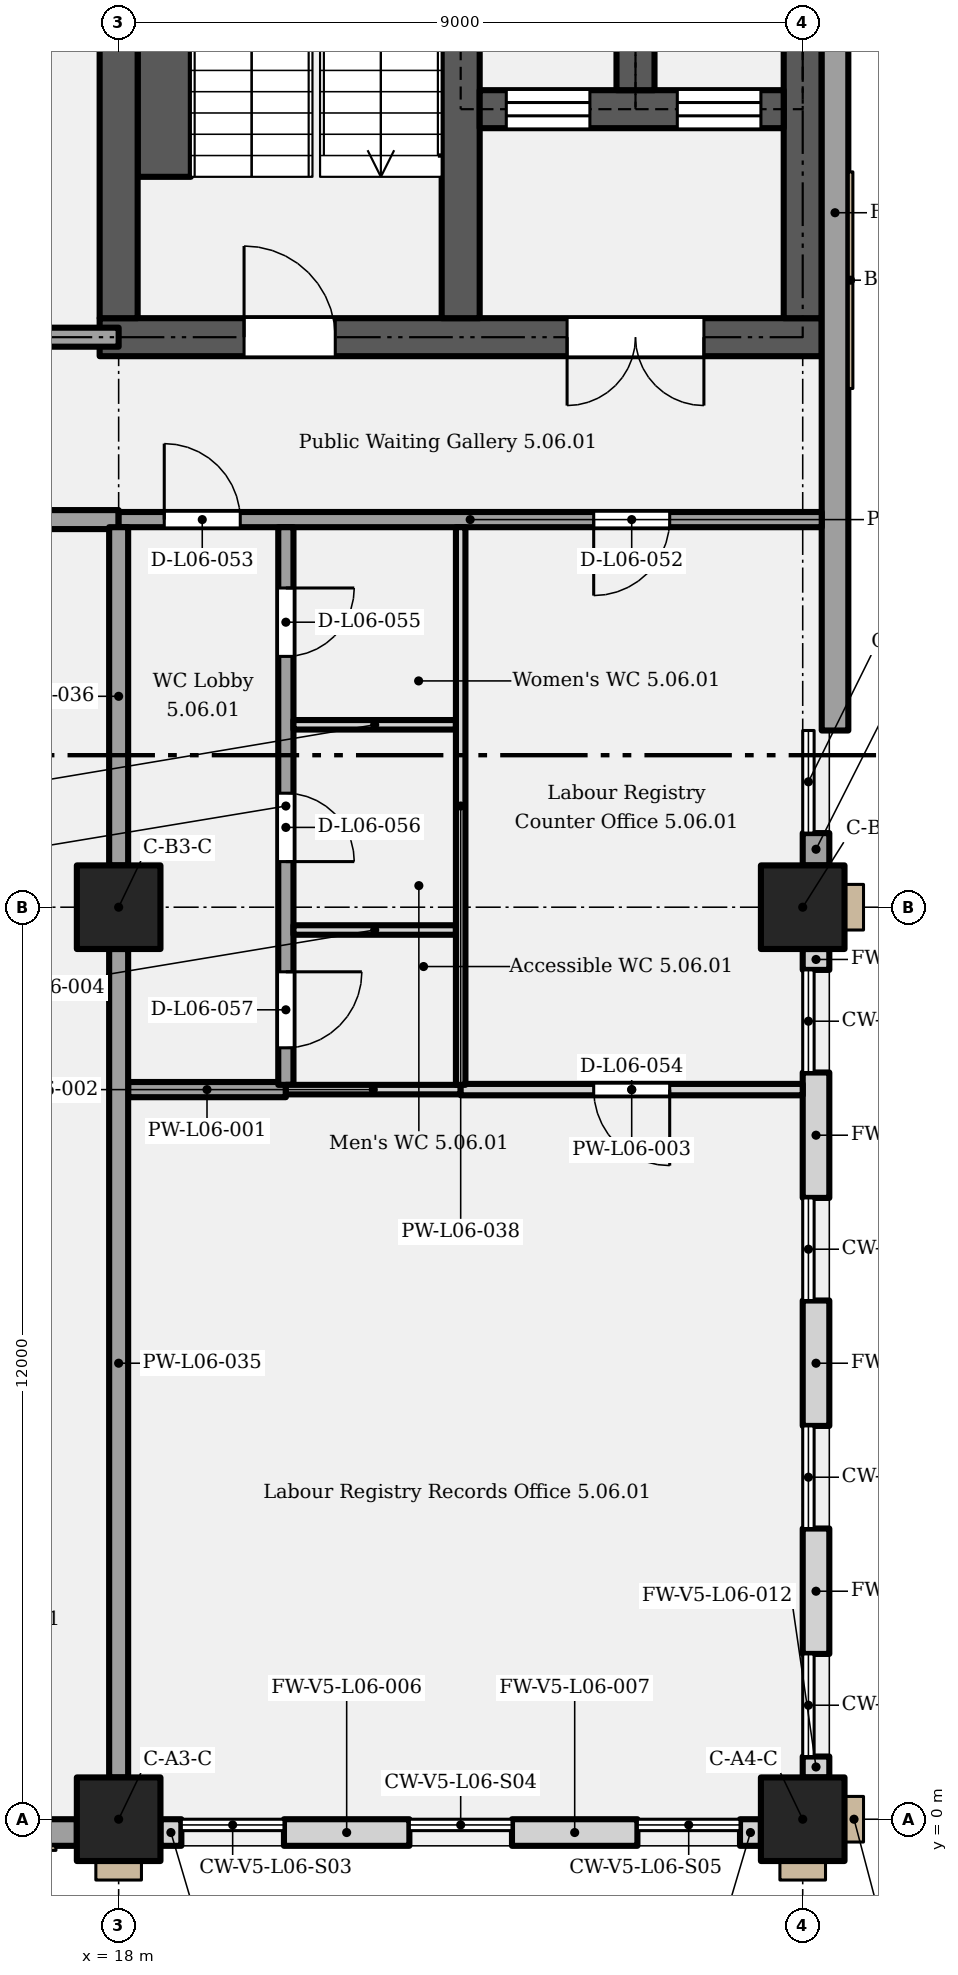
"""IFC4 building model, lengths in metres.
Left out: names, types, materials, properties, quantities, classifications, styles, units other than length and angle.
Written with IfcOpenShell. Run it as: python <this file> out.ifc"""

import sys

from ifc_helpers import new_model, si_unit, direction, frame, frame_2d, origin, origin_2d, place, context, subcontext, project, spatial, rectangle, extrude, element, fill, save


model = new_model("IFC4")
c1 = context("Model", 3, precision=1e-05, world=origin(), true_north=direction((0.0, 1.0)))
c2 = subcontext(c1, "Body", "Model", "MODEL_VIEW")
j1 = project(units=[si_unit("LENGTHUNIT", "METRE"), si_unit("PLANEANGLEUNIT", "RADIAN")], contexts=[c1])
p1 = place(None, origin())
s1 = spatial("IfcSite", under=j1, at=p1, CompositionType="ELEMENT")
p2 = place(p1, origin())
s2 = spatial("IfcBuilding", under=s1, at=p2, CompositionType="ELEMENT")
p3 = place(p2, frame((0.0, 0.0, 33.6)))
s3 = spatial("IfcBuildingStorey", under=s2, at=p3, CompositionType="ELEMENT", Elevation=33.6)
for number, where, z_axis, x_axis in (
    (1, (18.0, 0.0, 0.0), (0.0, 0.0, 1.0), (1.0, 0.0, 0.0)),
    (2, (27.0, 0.0, 0.0), (0.0, 0.0, 1.0), (1.0, 0.0, 0.0)),
    (3, (18.0, 12.0, 0.0), (0.0, 0.0, 1.0), (1.0, 0.0, 0.0)),
    (4, (27.0, 12.0, 0.0), (0.0, 0.0, 1.0), (1.0, 0.0, 0.0)),
):
    element("IfcColumn", number, at=place(p3, frame(where, z_axis=z_axis, x_axis=x_axis)), inside=s3, PredefinedType="COLUMN", context=c2, shape_type="SweptSolid", body=[
        extrude(rectangle(XDim=1.1, YDim=1.1, at=origin_2d()), origin(), (0.0, 0.0, 1.0), 5.4),
    ])
p4 = place(p3, frame((17.75, 19.5, 0.0), z_axis=(0.0, 0.0, 1.0), x_axis=(1.0, 0.0, 0.0)))
e5 = element("IfcWall", 5, at=p4, inside=s3, PredefinedType="SHEAR", context=c2, shape_type="SweptSolid", body=[
    extrude(rectangle(XDim=9.5, YDim=0.5, at=frame_2d((4.75, 0.0))), origin(), (0.0, 0.0, 1.0), 5.15),
])
p5 = place(p4, frame((1.9, 0.0, 0.0)))
e6 = element("IfcOpeningElement", 6, at=p5, cuts=e5, PredefinedType="OPENING", context=c2, shape_type="SweptSolid", body=[
    extrude(rectangle(XDim=1.2, YDim=2.1, at=frame_2d((0.6, 1.05))), frame((0.0, 0.26, 0.0), z_axis=(0.0, -1.0, 0.0), x_axis=(1.0, 0.0, 0.0)), (0.0, 0.0, 1.0), 0.52),
])
p6 = place(p4, frame((7.95, 0.0, 0.0), z_axis=(0.0, 0.0, 1.0), x_axis=(-1.0, 0.0, 0.0)))
e7 = element("IfcOpeningElement", 7, at=p6, cuts=e5, PredefinedType="OPENING", context=c2, shape_type="SweptSolid", body=[
    extrude(rectangle(XDim=1.8, YDim=2.1, at=frame_2d((0.9, 1.05))), frame((0.0, 0.26, 0.0), z_axis=(0.0, -1.0, 0.0), x_axis=(1.0, 0.0, 0.0)), (0.0, 0.0, 1.0), 0.52),
])
p7 = place(p3, frame((18.0, 19.75, 0.0), z_axis=(0.0, 0.0, 1.0), x_axis=(0.0, 1.0, 0.0)))
e8 = element("IfcWall", 8, at=p7, inside=s3, PredefinedType="SHEAR", context=c2, shape_type="SweptSolid", body=[
    extrude(rectangle(XDim=8.2, YDim=0.5, at=frame_2d((4.1, 0.0))), origin(), (0.0, 0.0, 1.0), 5.15),
])
p8 = place(p3, frame((22.5, 19.75, 0.0), z_axis=(0.0, 0.0, 1.0), x_axis=(0.0, 1.0, 0.0)))
e9 = element("IfcWall", 9, at=p8, inside=s3, PredefinedType="SHEAR", context=c2, shape_type="SweptSolid", body=[
    extrude(rectangle(XDim=8.5, YDim=0.5, at=frame_2d((4.25, 0.0))), origin(), (0.0, 0.0, 1.0), 5.15),
])
p9 = place(p3, frame((27.0, 19.75, 0.0), z_axis=(0.0, 0.0, 1.0), x_axis=(0.0, 1.0, 0.0)))
e10 = element("IfcWall", 10, at=p9, inside=s3, PredefinedType="SHEAR", context=c2, shape_type="SweptSolid", body=[
    extrude(rectangle(XDim=8.2, YDim=0.5, at=frame_2d((4.1, 0.0))), origin(), (0.0, 0.0, 1.0), 5.15),
])
p10 = place(p3, frame((22.75, 22.5, 0.0), z_axis=(0.0, 0.0, 1.0), x_axis=(1.0, 0.0, 0.0)))
e11 = element("IfcWall", 11, at=p10, inside=s3, PredefinedType="SHEAR", context=c2, shape_type="SweptSolid", body=[
    extrude(rectangle(XDim=4.0, YDim=0.5, at=frame_2d((2.0, 0.0))), origin(), (0.0, 0.0, 1.0), 5.15),
])
p11 = place(p10, frame((0.35, 0.0, 0.0)))
e12 = element("IfcOpeningElement", 12, at=p11, cuts=e11, PredefinedType="OPENING", context=c2, shape_type="SweptSolid", body=[
    extrude(rectangle(XDim=1.1, YDim=2.1, at=frame_2d((0.55, 1.05))), frame((0.0, 0.26, 0.0), z_axis=(0.0, -1.0, 0.0), x_axis=(1.0, 0.0, 0.0)), (0.0, 0.0, 1.0), 0.52),
])
p12 = place(p10, frame((2.6, 0.0, 0.0)))
e13 = element("IfcOpeningElement", 13, at=p12, cuts=e11, PredefinedType="OPENING", context=c2, shape_type="SweptSolid", body=[
    extrude(rectangle(XDim=1.1, YDim=2.1, at=frame_2d((0.55, 1.05))), frame((0.0, 0.26, 0.0), z_axis=(0.0, -1.0, 0.0), x_axis=(1.0, 0.0, 0.0)), (0.0, 0.0, 1.0), 0.52),
])
p13 = place(p3, frame((24.8, 22.75, 0.0), z_axis=(0.0, 0.0, 1.0), x_axis=(0.0, 1.0, 0.0)))
e14 = element("IfcWall", 14, at=p13, inside=s3, PredefinedType="SHEAR", context=c2, shape_type="SweptSolid", body=[
    extrude(rectangle(XDim=5.5, YDim=0.5, at=frame_2d((2.75, 0.0))), origin(), (0.0, 0.0, 1.0), 5.15),
])
p14 = place(p3, frame((9.55, -0.175, 0.0), z_axis=(0.0, 0.0, 1.0), x_axis=(1.0, 0.0, 0.0)))
e15 = element("IfcWall", 15, at=p14, inside=s3, PredefinedType="SOLIDWALL", context=c2, shape_type="SweptSolid", body=[
    extrude(rectangle(XDim=7.9, YDim=0.35, at=frame_2d((3.95, 0.0))), origin(), (0.0, 0.0, 1.0), 5.15),
])
p15 = place(p3, frame((18.55, -0.175, 0.0), z_axis=(0.0, 0.0, 1.0), x_axis=(1.0, 0.0, 0.0)))
e16 = element("IfcWall", 16, at=p15, inside=s3, PredefinedType="SOLIDWALL", context=c2, shape_type="SweptSolid", body=[
    extrude(rectangle(XDim=0.275, YDim=0.35, at=frame_2d((0.137, 0.0))), origin(), (0.0, 0.0, 1.0), 5.15),
])
for number, where, z_axis, x_axis in (
    (17, (20.175, -0.175, 0.0), (0.0, 0.0, 1.0), (1.0, 0.0, 0.0)),
    (18, (23.175, -0.175, 0.0), (0.0, 0.0, 1.0), (1.0, 0.0, 0.0)),
):
    element("IfcWall", number, at=place(p3, frame(where, z_axis=z_axis, x_axis=x_axis)), inside=s3, PredefinedType="SOLIDWALL", context=c2, shape_type="SweptSolid", body=[
        extrude(rectangle(XDim=1.65, YDim=0.35, at=frame_2d((0.825, 0.0))), origin(), (0.0, 0.0, 1.0), 5.15),
    ])
for number, where, z_axis, x_axis in (
    (19, (26.175, -0.175, 0.0), (0.0, 0.0, 1.0), (1.0, 0.0, 0.0)),
    (20, (27.175, 0.55, 0.0), (0.0, 0.0, 1.0), (0.0, 1.0, 0.0)),
):
    element("IfcWall", number, at=place(p3, frame(where, z_axis=z_axis, x_axis=x_axis)), inside=s3, PredefinedType="SOLIDWALL", context=c2, shape_type="SweptSolid", body=[
        extrude(rectangle(XDim=0.275, YDim=0.35, at=frame_2d((0.137, 0.0))), origin(), (0.0, 0.0, 1.0), 5.15),
    ])
for number, where, z_axis, x_axis in (
    (21, (27.175, 2.175, 0.0), (0.0, 0.0, 1.0), (0.0, 1.0, 0.0)),
    (22, (27.175, 5.175, 0.0), (0.0, 0.0, 1.0), (0.0, 1.0, 0.0)),
    (23, (27.175, 8.175, 0.0), (0.0, 0.0, 1.0), (0.0, 1.0, 0.0)),
):
    element("IfcWall", number, at=place(p3, frame(where, z_axis=z_axis, x_axis=x_axis)), inside=s3, PredefinedType="SOLIDWALL", context=c2, shape_type="SweptSolid", body=[
        extrude(rectangle(XDim=1.65, YDim=0.35, at=frame_2d((0.825, 0.0))), origin(), (0.0, 0.0, 1.0), 5.15),
    ])
p16 = place(p3, frame((27.175, 11.175, 0.0), z_axis=(0.0, 0.0, 1.0), x_axis=(0.0, 1.0, 0.0)))
e24 = element("IfcWall", 24, at=p16, inside=s3, PredefinedType="SOLIDWALL", context=c2, shape_type="SweptSolid", body=[
    extrude(rectangle(XDim=0.275, YDim=0.35, at=frame_2d((0.137, 0.0))), origin(), (0.0, 0.0, 1.0), 5.15),
])
p17 = place(p3, frame((27.175, 12.55, 0.0), z_axis=(0.0, 0.0, 1.0), x_axis=(0.0, 1.0, 0.0)))
e25 = element("IfcWall", 25, at=p17, inside=s3, PredefinedType="SOLIDWALL", context=c2, shape_type="SweptSolid", body=[
    extrude(rectangle(XDim=0.425, YDim=0.35, at=frame_2d((0.212, 0.0))), origin(), (0.0, 0.0, 1.0), 5.15),
])
p18 = place(p3, frame((27.425, 14.325, 0.0), z_axis=(0.0, 0.0, 1.0), x_axis=(0.0, 1.0, 0.0)))
e26 = element("IfcWall", 26, at=p18, inside=s3, PredefinedType="SOLIDWALL", context=c2, shape_type="SweptSolid", body=[
    extrude(rectangle(XDim=13.625, YDim=0.35, at=frame_2d((6.812, 0.0))), origin(), (0.0, 0.0, 1.0), 5.15),
])
p19 = place(p3, frame((18.125, 9.6, 0.0), z_axis=(0.0, 0.0, 1.0), x_axis=(1.0, 0.0, 0.0)))
e27 = element("IfcWall", 27, at=p19, inside=s3, PredefinedType="PARTITIONING", context=c2, shape_type="SweptSolid", body=[
    extrude(rectangle(XDim=2.075, YDim=0.2, at=frame_2d((1.038, 0.0))), origin(), (0.0, 0.0, 1.0), 5.15),
])
p20 = place(p3, frame((20.2, 9.6, 0.0), z_axis=(0.0, 0.0, 1.0), x_axis=(1.0, 0.0, 0.0)))
e28 = element("IfcWall", 28, at=p20, inside=s3, PredefinedType="PARTITIONING", context=c2, shape_type="SweptSolid", body=[
    extrude(rectangle(XDim=2.3, YDim=0.125, at=frame_2d((1.15, 0.0))), origin(), (0.0, 0.0, 1.0), 5.15),
])
p21 = place(p3, frame((22.5, 9.6, 0.0), z_axis=(0.0, 0.0, 1.0), x_axis=(1.0, 0.0, 0.0)))
e29 = element("IfcWall", 29, at=p21, inside=s3, PredefinedType="PARTITIONING", context=c2, shape_type="SweptSolid", body=[
    extrude(rectangle(XDim=4.5, YDim=0.15, at=frame_2d((2.25, 0.0))), origin(), (0.0, 0.0, 1.0), 5.15),
])
p22 = place(p21, frame((2.75, 0.0, 0.0), z_axis=(0.0, 0.0, 1.0), x_axis=(-1.0, 0.0, 0.0)))
e30 = element("IfcOpeningElement", 30, at=p22, cuts=e29, PredefinedType="OPENING", context=c2, shape_type="SweptSolid", body=[
    extrude(rectangle(XDim=1.0, YDim=2.1, at=frame_2d((0.5, 1.05))), frame((0.0, 0.085, 0.0), z_axis=(0.0, -1.0, 0.0), x_axis=(1.0, 0.0, 0.0)), (0.0, 0.0, 1.0), 0.17),
])
p23 = place(p3, frame((20.3, 11.7, 0.0), z_axis=(0.0, 0.0, 1.0), x_axis=(1.0, 0.0, 0.0)))
e31 = element("IfcWall", 31, at=p23, inside=s3, PredefinedType="PARTITIONING", context=c2, shape_type="SweptSolid", body=[
    extrude(rectangle(XDim=2.137, YDim=0.125, at=frame_2d((1.069, 0.0))), origin(), (0.0, 0.0, 1.0), 4.4),
])
p24 = place(p3, frame((20.3, 14.4, 0.0), z_axis=(0.0, 0.0, 1.0), x_axis=(1.0, 0.0, 0.0)))
e32 = element("IfcWall", 32, at=p24, inside=s3, PredefinedType="PARTITIONING", context=c2, shape_type="SweptSolid", body=[
    extrude(rectangle(XDim=2.137, YDim=0.125, at=frame_2d((1.069, 0.0))), origin(), (0.0, 0.0, 1.0), 5.15),
])
p25 = place(p3, frame((9.0, 17.1, 0.0), z_axis=(0.0, 0.0, 1.0), x_axis=(1.0, 0.0, 0.0)))
e33 = element("IfcWall", 33, at=p25, inside=s3, PredefinedType="PARTITIONING", context=c2, shape_type="SweptSolid", body=[
    extrude(rectangle(XDim=9.0, YDim=0.25, at=frame_2d((4.5, 0.0))), origin(), (0.0, 0.0, 1.0), 5.15),
])
p26 = place(p25, frame((6.9, 0.0, 0.0), z_axis=(0.0, 0.0, 1.0), x_axis=(-1.0, 0.0, 0.0)))
e34 = element("IfcOpeningElement", 34, at=p26, cuts=e33, PredefinedType="OPENING", context=c2, shape_type="SweptSolid", body=[
    extrude(rectangle(XDim=1.8, YDim=2.4, at=frame_2d((0.9, 1.2))), frame((0.0, 0.135, 0.0), z_axis=(0.0, -1.0, 0.0), x_axis=(1.0, 0.0, 0.0)), (0.0, 0.0, 1.0), 0.27),
])
p27 = place(p25, frame((2.0, 0.0, 0.0), z_axis=(0.0, 0.0, 1.0), x_axis=(-1.0, 0.0, 0.0)))
e35 = element("IfcOpeningElement", 35, at=p27, cuts=e33, PredefinedType="OPENING", context=c2, shape_type="SweptSolid", body=[
    extrude(rectangle(XDim=1.0, YDim=2.1, at=frame_2d((0.5, 1.05))), frame((0.0, 0.135, 0.0), z_axis=(0.0, -1.0, 0.0), x_axis=(1.0, 0.0, 0.0)), (0.0, 0.0, 1.0), 0.27),
])
p28 = place(p3, frame((18.0, 17.1, 0.0), z_axis=(0.0, 0.0, 1.0), x_axis=(1.0, 0.0, 0.0)))
e36 = element("IfcWall", 36, at=p28, inside=s3, PredefinedType="PARTITIONING", context=c2, shape_type="SweptSolid", body=[
    extrude(rectangle(XDim=9.25, YDim=0.2, at=frame_2d((4.625, 0.0))), origin(), (0.0, 0.0, 1.0), 5.15),
])
p29 = place(p28, frame((7.25, 0.0, 0.0), z_axis=(0.0, 0.0, 1.0), x_axis=(-1.0, 0.0, 0.0)))
e37 = element("IfcOpeningElement", 37, at=p29, cuts=e36, PredefinedType="OPENING", context=c2, shape_type="SweptSolid", body=[
    extrude(rectangle(XDim=1.0, YDim=2.1, at=frame_2d((0.5, 1.05))), frame((0.0, 0.11, 0.0), z_axis=(0.0, -1.0, 0.0), x_axis=(1.0, 0.0, 0.0)), (0.0, 0.0, 1.0), 0.22),
])
p30 = place(p28, frame((0.6, 0.0, 0.0)))
e38 = element("IfcOpeningElement", 38, at=p30, cuts=e36, PredefinedType="OPENING", context=c2, shape_type="SweptSolid", body=[
    extrude(rectangle(XDim=1.0, YDim=2.1, at=frame_2d((0.5, 1.05))), frame((0.0, 0.11, 0.0), z_axis=(0.0, -1.0, 0.0), x_axis=(1.0, 0.0, 0.0)), (0.0, 0.0, 1.0), 0.22),
])
p31 = place(p3, frame((9.0, 19.5, 0.0), z_axis=(0.0, 0.0, 1.0), x_axis=(1.0, 0.0, 0.0)))
e39 = element("IfcWall", 39, at=p31, inside=s3, PredefinedType="PARTITIONING", context=c2, shape_type="SweptSolid", body=[
    extrude(rectangle(XDim=9.0, YDim=0.25, at=frame_2d((4.5, 0.0))), origin(), (0.0, 0.0, 1.0), 5.15),
])
p32 = place(p31, frame((5.1, 0.0, 0.0)))
e40 = element("IfcOpeningElement", 40, at=p32, cuts=e39, PredefinedType="OPENING", context=c2, shape_type="SweptSolid", body=[
    extrude(rectangle(XDim=1.8, YDim=2.4, at=frame_2d((0.9, 1.2))), frame((0.0, 0.135, 0.0), z_axis=(0.0, -1.0, 0.0), x_axis=(1.0, 0.0, 0.0)), (0.0, 0.0, 1.0), 0.27),
])
p33 = place(p31, frame((1.0, 0.0, 0.0)))
e41 = element("IfcOpeningElement", 41, at=p33, cuts=e39, PredefinedType="OPENING", context=c2, shape_type="SweptSolid", body=[
    extrude(rectangle(XDim=1.0, YDim=2.1, at=frame_2d((0.5, 1.05))), frame((0.0, 0.135, 0.0), z_axis=(0.0, -1.0, 0.0), x_axis=(1.0, 0.0, 0.0)), (0.0, 0.0, 1.0), 0.27),
])
p34 = place(p3, frame((18.0, 0.55, 0.0), z_axis=(0.0, 0.0, 1.0), x_axis=(0.0, 1.0, 0.0)))
e42 = element("IfcWall", 42, at=p34, inside=s3, PredefinedType="PARTITIONING", context=c2, shape_type="SweptSolid", body=[
    extrude(rectangle(XDim=10.9, YDim=0.25, at=frame_2d((5.45, 0.0))), origin(), (0.0, 0.0, 1.0), 4.4),
])
p35 = place(p3, frame((18.0, 12.55, 0.0), z_axis=(0.0, 0.0, 1.0), x_axis=(0.0, 1.0, 0.0)))
e43 = element("IfcWall", 43, at=p35, inside=s3, PredefinedType="PARTITIONING", context=c2, shape_type="SweptSolid", body=[
    extrude(rectangle(XDim=4.45, YDim=0.25, at=frame_2d((2.225, 0.0))), origin(), (0.0, 0.0, 1.0), 4.2),
])
p36 = place(p3, frame((20.2, 9.663, 0.0), z_axis=(0.0, 0.0, 1.0), x_axis=(0.0, 1.0, 0.0)))
e44 = element("IfcWall", 44, at=p36, inside=s3, PredefinedType="PARTITIONING", context=c2, shape_type="SweptSolid", body=[
    extrude(rectangle(XDim=7.337, YDim=0.2, at=frame_2d((3.669, 0.0))), origin(), (0.0, 0.0, 1.0), 5.15),
])
p37 = place(p36, frame((6.537, 0.0, 0.0), z_axis=(0.0, 0.0, 1.0), x_axis=(-1.0, 0.0, 0.0)))
e45 = element("IfcOpeningElement", 45, at=p37, cuts=e44, PredefinedType="OPENING", context=c2, shape_type="SweptSolid", body=[
    extrude(rectangle(XDim=0.9, YDim=2.1, at=frame_2d((0.45, 1.05))), frame((0.0, 0.11, 0.0), z_axis=(0.0, -1.0, 0.0), x_axis=(1.0, 0.0, 0.0)), (0.0, 0.0, 1.0), 0.22),
])
p38 = place(p36, frame((3.837, 0.0, 0.0), z_axis=(0.0, 0.0, 1.0), x_axis=(-1.0, 0.0, 0.0)))
e46 = element("IfcOpeningElement", 46, at=p38, cuts=e44, PredefinedType="OPENING", context=c2, shape_type="SweptSolid", body=[
    extrude(rectangle(XDim=0.9, YDim=2.1, at=frame_2d((0.45, 1.05))), frame((0.0, 0.11, 0.0), z_axis=(0.0, -1.0, 0.0), x_axis=(1.0, 0.0, 0.0)), (0.0, 0.0, 1.0), 0.22),
])
p39 = place(p36, frame((1.488, 0.0, 0.0), z_axis=(0.0, 0.0, 1.0), x_axis=(-1.0, 0.0, 0.0)))
e47 = element("IfcOpeningElement", 47, at=p39, cuts=e44, PredefinedType="OPENING", context=c2, shape_type="SweptSolid", body=[
    extrude(rectangle(XDim=1.0, YDim=2.1, at=frame_2d((0.5, 1.05))), frame((0.0, 0.11, 0.0), z_axis=(0.0, -1.0, 0.0), x_axis=(1.0, 0.0, 0.0)), (0.0, 0.0, 1.0), 0.22),
])
p40 = place(p3, frame((22.5, 9.663, 0.0), z_axis=(0.0, 0.0, 1.0), x_axis=(0.0, 1.0, 0.0)))
e48 = element("IfcWall", 48, at=p40, inside=s3, PredefinedType="PARTITIONING", context=c2, shape_type="SweptSolid", body=[
    extrude(rectangle(XDim=7.337, YDim=0.125, at=frame_2d((3.669, 0.0))), origin(), (0.0, 0.0, 1.0), 5.15),
])
p41 = place(p3, frame((18.6, 21.61, 0.0), z_axis=(0.0, 0.0, 1.0), x_axis=(0.0, 1.0, 0.0)))
e49 = element("IfcWall", 49, at=p41, inside=s3, PredefinedType="SHEAR", context=c2, shape_type="SweptSolid", body=[
    extrude(rectangle(XDim=6.14, YDim=0.7, at=frame_2d((3.07, 0.0))), origin(), (0.0, 0.0, 1.0), 2.587),
])
p42 = place(p5, origin())
e50 = element("IfcDoor", 50, at=p42, inside=s3, OperationType="SINGLE_SWING_LEFT", PredefinedType="DOOR", context=c2, shape_type="SweptSolid", body=[
    extrude(rectangle(XDim=1.2, YDim=2.1, at=frame_2d((0.6, 1.05))), frame((0.0, 0.025, 0.0), z_axis=(0.0, -1.0, 0.0), x_axis=(1.0, 0.0, 0.0)), (0.0, 0.0, 1.0), 0.05),
])
fill(e6, e50)
p43 = place(p6, origin())
e51 = element("IfcDoor", 51, at=p43, inside=s3, OperationType="DOUBLE_DOOR_SINGLE_SWING", PredefinedType="DOOR", context=c2, shape_type="SweptSolid", body=[
    extrude(rectangle(XDim=1.8, YDim=2.1, at=frame_2d((0.9, 1.05))), frame((0.0, 0.025, 0.0), z_axis=(0.0, -1.0, 0.0), x_axis=(1.0, 0.0, 0.0)), (0.0, 0.0, 1.0), 0.05),
])
fill(e7, e51)
p44 = place(p11, origin())
e52 = element("IfcDoor", 52, at=p44, inside=s3, OperationType="SLIDING_TO_LEFT", PredefinedType="DOOR", context=c2, shape_type="SweptSolid", body=[
    extrude(rectangle(XDim=1.1, YDim=2.1, at=frame_2d((0.55, 1.05))), frame((0.0, 0.025, 0.0), z_axis=(0.0, -1.0, 0.0), x_axis=(1.0, 0.0, 0.0)), (0.0, 0.0, 1.0), 0.05),
])
fill(e12, e52)
p45 = place(p12, origin())
e53 = element("IfcDoor", 53, at=p45, inside=s3, OperationType="SLIDING_TO_LEFT", PredefinedType="DOOR", context=c2, shape_type="SweptSolid", body=[
    extrude(rectangle(XDim=1.1, YDim=2.1, at=frame_2d((0.55, 1.05))), frame((0.0, 0.025, 0.0), z_axis=(0.0, -1.0, 0.0), x_axis=(1.0, 0.0, 0.0)), (0.0, 0.0, 1.0), 0.05),
])
fill(e13, e53)
p46 = place(p29, origin())
e54 = element("IfcDoor", 54, at=p46, inside=s3, OperationType="SINGLE_SWING_RIGHT", PredefinedType="DOOR", context=c2, shape_type="SweptSolid", body=[
    extrude(rectangle(XDim=1.0, YDim=2.1, at=frame_2d((0.5, 1.05))), frame((0.0, 0.025, 0.0), z_axis=(0.0, -1.0, 0.0), x_axis=(1.0, 0.0, 0.0)), (0.0, 0.0, 1.0), 0.05),
])
fill(e37, e54)
p47 = place(p30, origin())
e55 = element("IfcDoor", 55, at=p47, inside=s3, OperationType="SINGLE_SWING_LEFT", PredefinedType="DOOR", context=c2, shape_type="SweptSolid", body=[
    extrude(rectangle(XDim=1.0, YDim=2.1, at=frame_2d((0.5, 1.05))), frame((0.0, 0.025, 0.0), z_axis=(0.0, -1.0, 0.0), x_axis=(1.0, 0.0, 0.0)), (0.0, 0.0, 1.0), 0.05),
])
fill(e38, e55)
p48 = place(p22, origin())
e56 = element("IfcDoor", 56, at=p48, inside=s3, OperationType="SINGLE_SWING_LEFT", PredefinedType="DOOR", context=c2, shape_type="SweptSolid", body=[
    extrude(rectangle(XDim=1.0, YDim=2.1, at=frame_2d((0.5, 1.05))), frame((0.0, 0.025, 0.0), z_axis=(0.0, -1.0, 0.0), x_axis=(1.0, 0.0, 0.0)), (0.0, 0.0, 1.0), 0.05),
])
fill(e30, e56)
p49 = place(p37, origin())
e57 = element("IfcDoor", 57, at=p49, inside=s3, OperationType="SINGLE_SWING_LEFT", PredefinedType="DOOR", context=c2, shape_type="SweptSolid", body=[
    extrude(rectangle(XDim=0.9, YDim=2.1, at=frame_2d((0.45, 1.05))), frame((0.0, 0.025, 0.0), z_axis=(0.0, -1.0, 0.0), x_axis=(1.0, 0.0, 0.0)), (0.0, 0.0, 1.0), 0.05),
])
fill(e45, e57)
p50 = place(p38, origin())
e58 = element("IfcDoor", 58, at=p50, inside=s3, OperationType="SINGLE_SWING_RIGHT", PredefinedType="DOOR", context=c2, shape_type="SweptSolid", body=[
    extrude(rectangle(XDim=0.9, YDim=2.1, at=frame_2d((0.45, 1.05))), frame((0.0, 0.025, 0.0), z_axis=(0.0, -1.0, 0.0), x_axis=(1.0, 0.0, 0.0)), (0.0, 0.0, 1.0), 0.05),
])
fill(e46, e58)
p51 = place(p39, origin())
e59 = element("IfcDoor", 59, at=p51, inside=s3, OperationType="SINGLE_SWING_LEFT", PredefinedType="DOOR", context=c2, shape_type="SweptSolid", body=[
    extrude(rectangle(XDim=1.0, YDim=2.1, at=frame_2d((0.5, 1.05))), frame((0.0, 0.025, 0.0), z_axis=(0.0, -1.0, 0.0), x_axis=(1.0, 0.0, 0.0)), (0.0, 0.0, 1.0), 0.05),
])
fill(e47, e59)
save(model, sys.argv[1])
